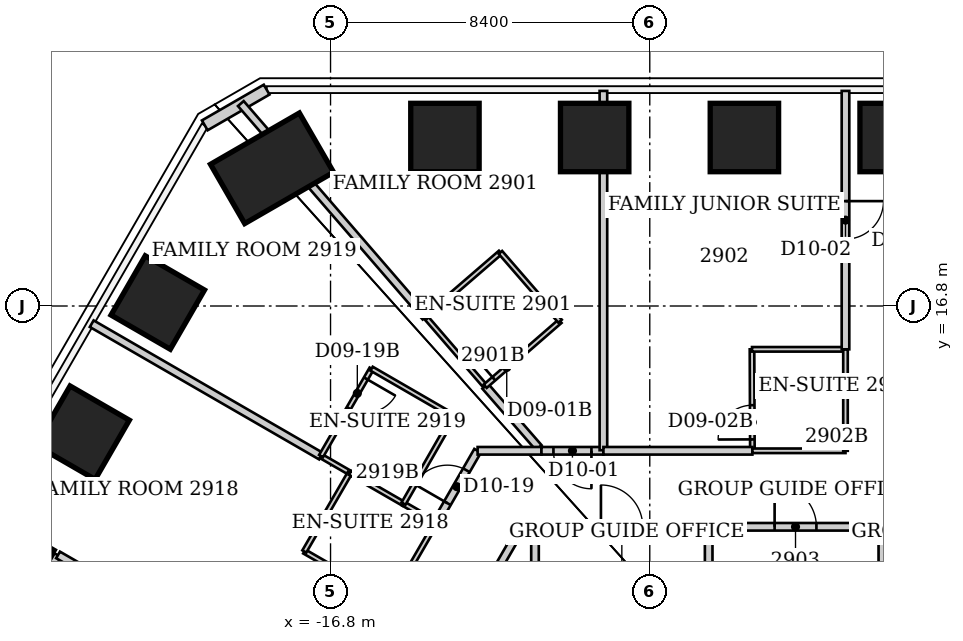
"""IFC4 building model, lengths in metres.
Left out: names, types, materials, properties, quantities, classifications, styles, units other than length and angle.
Written with IfcOpenShell. Run it as: python <this file> out.ifc"""

import sys

from ifc_helpers import new_model, si_unit, direction, frame, frame_2d, origin, origin_2d, place, context, subcontext, project, spatial, rectangle, extrude, element, fill, save


model = new_model("IFC4")
c1 = context("Model", 3, precision=1e-05, world=origin(), true_north=direction((0.0, 1.0)))
c2 = subcontext(c1, "Body", "Model", "MODEL_VIEW")
j1 = project(units=[si_unit("LENGTHUNIT", "METRE"), si_unit("PLANEANGLEUNIT", "RADIAN")], contexts=[c1])
p1 = place(None, origin())
s1 = spatial("IfcSite", under=j1, at=p1, CompositionType="ELEMENT")
p2 = place(p1, origin())
s2 = spatial("IfcBuilding", under=s1, at=p2, CompositionType="ELEMENT")
p3 = place(p2, frame((0.0, 0.0, 119.6)))
s3 = spatial("IfcBuildingStorey", under=s2, at=p3, CompositionType="ELEMENT", Elevation=119.6)
for number, where, z_axis, x_axis in (
    (1, (-13.79, 21.234, 0.0), (0.0, 0.0, 1.0), (0.0, 1.0, 0.0)),
    (2, (-9.85, 21.234, 0.0), (0.0, 0.0, 1.0), (0.0, 1.0, 0.0)),
    (3, (-5.91, 21.234, 0.0), (0.0, 0.0, 1.0), (0.0, 1.0, 0.0)),
    (4, (-1.97, 21.234, 0.0), (0.0, 0.0, 1.0), (0.0, 1.0, 0.0)),
    (5, (-25.302, 10.041, 0.0), (0.0, 0.0, 1.0), (-0.866, 0.5, 0.0)),
    (6, (-23.324, 13.466, 0.0), (0.0, 0.0, 1.0), (-0.866, 0.5, 0.0)),
    (7, (-21.346, 16.891, 0.0), (0.0, 0.0, 1.0), (-0.866, 0.5, 0.0)),
):
    element("IfcColumn", number, at=place(p3, frame(where, z_axis=z_axis, x_axis=x_axis)), inside=s3, PredefinedType="COLUMN", context=c2, shape_type="SweptSolid", body=[
        extrude(rectangle(XDim=1.8, YDim=1.8, at=origin_2d()), origin(), (0.0, 0.0, 1.0), 3.8),
    ])
p4 = place(p3, frame((-18.339, 20.424, 0.0), z_axis=(0.0, 0.0, 1.0), x_axis=(-0.5, 0.866025403784, 0.0)))
e8 = element("IfcColumn", 8, at=p4, inside=s3, PredefinedType="COLUMN", context=c2, shape_type="SweptSolid", body=[
    extrude(rectangle(XDim=1.8, YDim=2.7, at=origin_2d()), origin(), (0.0, 0.0, 1.0), 3.8),
])
p5 = place(p3, frame((-20.11, 21.554, 0.0), z_axis=(0.0, 0.0, 1.0), x_axis=(0.865988793993, 0.500063404658, 0.0)))
e9 = element("IfcWall", 9, at=p5, inside=s3, PredefinedType="SOLIDWALL", context=c2, shape_type="SweptSolid", body=[
    extrude(rectangle(XDim=1.88, YDim=0.3, at=frame_2d((0.94, 0.0))), origin(), (0.0, 0.0, 1.0), 3.64),
])
p6 = place(p3, frame((-24.57, 9.21, 0.0), z_axis=(0.0, 0.0, 1.0), x_axis=(0.499734288277, 0.866178758179, 0.0)))
e10 = element("IfcWall", 10, at=p6, inside=s3, PredefinedType="PARTITIONING", context=c2, shape_type="SweptSolid", body=[
    extrude(rectangle(XDim=1.191, YDim=0.2, at=frame_2d((0.595, 0.0))), origin(), (0.0, 0.0, 1.0), 3.64),
])
p7 = place(p3, frame((-23.084, 16.335, 0.0), z_axis=(0.0, 0.0, 1.0), x_axis=(0.865889693368, -0.500234983702, 0.0)))
e11 = element("IfcWall", 11, at=p7, inside=s3, PredefinedType="PARTITIONING", context=c2, shape_type="SweptSolid", body=[
    extrude(rectangle(XDim=6.968, YDim=0.2, at=frame_2d((3.484, 0.0))), origin(), (0.0, 0.0, 1.0), 3.64),
])
p8 = place(p3, frame((-19.16, 22.127, 0.0), z_axis=(0.0, 0.0, 1.0), x_axis=(0.654324699903, -0.756213717871, 0.0)))
e12 = element("IfcWall", 12, at=p8, inside=s3, PredefinedType="PARTITIONING", context=c2, shape_type="SweptSolid", body=[
    extrude(rectangle(XDim=7.428, YDim=0.2, at=frame_2d((3.714, 0.0))), origin(), (0.0, 0.0, 1.0), 3.64),
])
p9 = place(p3, frame((-17.49, 10.34, 0.0), z_axis=(0.0, 0.0, 1.0), x_axis=(0.866114241029, -0.499846097802, 0.0)))
e13 = element("IfcWall", 13, at=p9, inside=s3, PredefinedType="PARTITIONING", context=c2, shape_type="SweptSolid", body=[
    extrude(rectangle(XDim=2.621, YDim=0.12, at=frame_2d((1.311, 0.0))), origin(), (0.0, 0.0, 1.0), 3.64),
])
p10 = place(p9, frame((1.421, 0.0, 0.0)))
e14 = element("IfcOpeningElement", 14, at=p10, cuts=e13, PredefinedType="OPENING", context=c2, shape_type="SweptSolid", body=[
    extrude(rectangle(XDim=0.9, YDim=2.03, at=frame_2d((0.45, 1.015))), frame((0.0, 0.06, 0.0), z_axis=(0.0, -1.0, 0.0), x_axis=(1.0, 0.0, 0.0)), (0.0, 0.0, 1.0), 0.12),
])
p11 = place(p3, frame((-17.051, 12.849, 0.0), z_axis=(0.0, 0.0, 1.0), x_axis=(0.865838315616, -0.500323906295, 0.0)))
e15 = element("IfcWall", 15, at=p11, inside=s3, PredefinedType="PARTITIONING", context=c2, shape_type="SweptSolid", body=[
    extrude(rectangle(XDim=0.878, YDim=0.12, at=frame_2d((0.439, 0.0))), origin(), (0.0, 0.0, 1.0), 3.64),
])
p12 = place(p3, frame((-16.88, 6.16, 0.0), z_axis=(0.0, 0.0, 1.0), x_axis=(-0.866203958324, 0.499690606859, 0.0)))
e16 = element("IfcWall", 16, at=p12, inside=s3, PredefinedType="PARTITIONING", context=c2, shape_type="SweptSolid", body=[
    extrude(rectangle(XDim=8.185, YDim=0.2, at=frame_2d((4.093, 0.0))), origin(), (0.0, 0.0, 1.0), 3.64),
])
p13 = place(p12, frame((3.593, 0.0, 0.0)))
e17 = element("IfcOpeningElement", 17, at=p13, cuts=e16, PredefinedType="OPENING", context=c2, shape_type="SweptSolid", body=[
    extrude(rectangle(XDim=1.0, YDim=2.13, at=frame_2d((0.5, 1.065))), frame((0.0, 0.1, 0.0), z_axis=(0.0, -1.0, 0.0), x_axis=(1.0, 0.0, 0.0)), (0.0, 0.0, 1.0), 0.2),
])
p14 = place(p3, frame((-16.29, 12.41, 0.0), z_axis=(0.0, 0.0, 1.0), x_axis=(-0.501547039172, -0.865130376012, 0.0)))
e18 = element("IfcWall", 18, at=p14, inside=s3, PredefinedType="PARTITIONING", context=c2, shape_type="SweptSolid", body=[
    extrude(rectangle(XDim=2.393, YDim=0.12, at=frame_2d((1.196, 0.0))), origin(), (0.0, 0.0, 1.0), 3.64),
])
p15 = place(p3, frame((-16.29, 12.41, 0.0), z_axis=(0.0, 0.0, 1.0), x_axis=(0.866138091645, -0.499804768086, 0.0)))
e19 = element("IfcWall", 19, at=p15, inside=s3, PredefinedType="PARTITIONING", context=c2, shape_type="SweptSolid", body=[
    extrude(rectangle(XDim=1.626, YDim=0.12, at=frame_2d((0.813, 0.0))), origin(), (0.0, 0.0, 1.0), 3.64),
])
p16 = place(p3, frame((-15.98, 3.7, 0.0), z_axis=(0.0, 0.0, 1.0), x_axis=(0.500093981358, 0.865971136822, 0.0)))
e20 = element("IfcWall", 20, at=p16, inside=s3, PredefinedType="PARTITIONING", context=c2, shape_type="SweptSolid", body=[
    extrude(rectangle(XDim=8.418, YDim=0.2, at=frame_2d((4.209, 0.0))), origin(), (0.0, 0.0, 1.0), 3.64),
])
p17 = place(p3, frame((-15.72, 15.15, 0.0), z_axis=(0.0, 0.0, 1.0), x_axis=(-0.500605174168, -0.865675724273, 0.0)))
e21 = element("IfcWall", 21, at=p17, inside=s3, PredefinedType="PARTITIONING", context=c2, shape_type="SweptSolid", body=[
    extrude(rectangle(XDim=2.657, YDim=0.12, at=frame_2d((1.329, 0.0))), origin(), (0.0, 0.0, 1.0), 3.64),
])
p18 = place(p17, frame((0.3, 0.0, 0.0)))
e22 = element("IfcOpeningElement", 22, at=p18, cuts=e21, PredefinedType="OPENING", context=c2, shape_type="SweptSolid", body=[
    extrude(rectangle(XDim=0.9, YDim=2.03, at=frame_2d((0.45, 1.015))), frame((0.0, 0.06, 0.0), z_axis=(0.0, -1.0, 0.0), x_axis=(1.0, 0.0, 0.0)), (0.0, 0.0, 1.0), 0.12),
])
p19 = place(p3, frame((-15.22, 9.03, 0.0), z_axis=(0.0, 0.0, 1.0), x_axis=(0.501502765098, 0.865156041763, 0.0)))
e23 = element("IfcWall", 23, at=p19, inside=s3, PredefinedType="PARTITIONING", context=c2, shape_type="SweptSolid", body=[
    extrude(rectangle(XDim=2.393, YDim=0.12, at=frame_2d((1.196, 0.0))), origin(), (0.0, 0.0, 1.0), 3.64),
])
p20 = place(p3, frame((-14.882, 11.597, 0.0), z_axis=(0.0, 0.0, 1.0), x_axis=(0.866181499781, -0.499729536286, 0.0)))
e24 = element("IfcWall", 24, at=p20, inside=s3, PredefinedType="PARTITIONING", context=c2, shape_type="SweptSolid", body=[
    extrude(rectangle(XDim=0.995, YDim=0.12, at=frame_2d((0.497, 0.0))), origin(), (0.0, 0.0, 1.0), 3.64),
])
p21 = place(p3, frame((-14.88, 11.6, 0.0), z_axis=(0.0, 0.0, 1.0), x_axis=(0.497704656183, 0.867346571569, 0.0)))
e25 = element("IfcWall", 25, at=p21, inside=s3, PredefinedType="PARTITIONING", context=c2, shape_type="SweptSolid", body=[
    extrude(rectangle(XDim=2.652, YDim=0.12, at=frame_2d((1.326, 0.0))), origin(), (0.0, 0.0, 1.0), 3.64),
])
p22 = place(p3, frame((-14.3, 16.51, 0.0), z_axis=(0.0, 0.0, 1.0), x_axis=(0.653188728136, -0.757195143563, 0.0)))
e26 = element("IfcWall", 26, at=p22, inside=s3, PredefinedType="PARTITIONING", context=c2, shape_type="SweptSolid", body=[
    extrude(rectangle(XDim=2.404, YDim=0.12, at=frame_2d((1.202, 0.0))), origin(), (0.0, 0.0, 1.0), 3.64),
])
p23 = place(p3, frame((-14.02, 11.1, 0.0), z_axis=(0.0, 0.0, 1.0), x_axis=(0.499641723021, 0.866232156305, 0.0)))
e27 = element("IfcWall", 27, at=p23, inside=s3, PredefinedType="PARTITIONING", context=c2, shape_type="SweptSolid", body=[
    extrude(rectangle(XDim=2.182, YDim=0.2, at=frame_2d((1.091, 0.0))), origin(), (0.0, 0.0, 1.0), 3.64),
])
p24 = place(p23, frame((0.591, 0.0, 0.0)))
e28 = element("IfcOpeningElement", 28, at=p24, cuts=e27, PredefinedType="OPENING", context=c2, shape_type="SweptSolid", body=[
    extrude(rectangle(XDim=1.0, YDim=2.13, at=frame_2d((0.5, 1.065))), frame((0.0, 0.1, 0.0), z_axis=(0.0, -1.0, 0.0), x_axis=(1.0, 0.0, 0.0)), (0.0, 0.0, 1.0), 0.2),
])
p25 = place(p3, frame((-13.56, 13.9, 0.0), z_axis=(0.0, 0.0, 1.0), x_axis=(-0.865508881864, 0.500893576935, 0.0)))
e29 = element("IfcWall", 29, at=p25, inside=s3, PredefinedType="PARTITIONING", context=c2, shape_type="SweptSolid", body=[
    extrude(rectangle(XDim=2.496, YDim=0.12, at=frame_2d((1.248, 0.0))), origin(), (0.0, 0.0, 1.0), 3.64),
])
p26 = place(p3, frame((-12.73, 14.69, 0.0), z_axis=(0.0, 0.0, 1.0), x_axis=(0.656624063312, -0.754218031792, 0.0)))
e30 = element("IfcWall", 30, at=p26, inside=s3, PredefinedType="PARTITIONING", context=c2, shape_type="SweptSolid", body=[
    extrude(rectangle(XDim=2.144, YDim=0.2, at=frame_2d((1.072, 0.0))), origin(), (0.0, 0.0, 1.0), 3.64),
])
p27 = place(p3, frame((-12.73, 14.69, 0.0), z_axis=(0.0, 0.0, 1.0), x_axis=(0.755185511235, 0.655511131576, 0.0)))
e31 = element("IfcWall", 31, at=p27, inside=s3, PredefinedType="PARTITIONING", context=c2, shape_type="SweptSolid", body=[
    extrude(rectangle(XDim=2.609, YDim=0.12, at=frame_2d((1.304, 0.0))), origin(), (0.0, 0.0, 1.0), 3.64),
])
p28 = place(p27, frame((0.3, 0.0, 0.0)))
e32 = element("IfcOpeningElement", 32, at=p28, cuts=e31, PredefinedType="OPENING", context=c2, shape_type="SweptSolid", body=[
    extrude(rectangle(XDim=0.9, YDim=2.03, at=frame_2d((0.45, 1.015))), frame((0.0, 0.06, 0.0), z_axis=(0.0, -1.0, 0.0), x_axis=(1.0, 0.0, 0.0)), (0.0, 0.0, 1.0), 0.12),
])
p29 = place(p3, frame((-12.33, 18.21, 0.0), z_axis=(0.0, 0.0, 1.0), x_axis=(-0.757086659925, -0.653314464377, 0.0)))
e33 = element("IfcWall", 33, at=p29, inside=s3, PredefinedType="PARTITIONING", context=c2, shape_type="SweptSolid", body=[
    extrude(rectangle(XDim=2.602, YDim=0.12, at=frame_2d((1.301, 0.0))), origin(), (0.0, 0.0, 1.0), 3.64),
])
p30 = place(p3, frame((-11.77, 10.99, 0.0), z_axis=(0.0, 0.0, 1.0), x_axis=(1.0, 0.0, 0.0)))
e34 = element("IfcWall", 34, at=p30, inside=s3, PredefinedType="PARTITIONING", context=c2, shape_type="SweptSolid", body=[
    extrude(rectangle(XDim=0.35, YDim=0.2, at=frame_2d((0.175, 0.0))), origin(), (0.0, 0.0, 1.0), 3.64),
])
p31 = place(p3, frame((-11.42, 10.98, 0.0), z_axis=(0.0, 0.0, 1.0), x_axis=(0.0, -1.0, 0.0)))
e35 = element("IfcWall", 35, at=p31, inside=s3, PredefinedType="PARTITIONING", context=c2, shape_type="SweptSolid", body=[
    extrude(rectangle(XDim=14.995, YDim=0.2, at=frame_2d((7.498, 0.0))), origin(), (0.0, 0.0, 1.0), 3.64),
])
p32 = place(p3, frame((-11.42, 10.99, 0.0), z_axis=(0.0, 0.0, 1.0), x_axis=(1.0, 0.0, 0.0)))
e36 = element("IfcWall", 36, at=p32, inside=s3, PredefinedType="PARTITIONING", context=c2, shape_type="SweptSolid", body=[
    extrude(rectangle(XDim=4.57, YDim=0.2, at=frame_2d((2.285, 0.0))), origin(), (0.0, 0.0, 1.0), 3.64),
])
p33 = place(p32, frame((1.735, 0.0, 0.0)))
e37 = element("IfcOpeningElement", 37, at=p33, cuts=e36, PredefinedType="OPENING", context=c2, shape_type="SweptSolid", body=[
    extrude(rectangle(XDim=1.1, YDim=2.2, at=frame_2d((0.55, 1.1))), frame((0.0, 0.1, 0.0), z_axis=(0.0, -1.0, 0.0), x_axis=(1.0, 0.0, 0.0)), (0.0, 0.0, 1.0), 0.2),
])
p34 = place(p3, frame((-11.25, 12.99, 0.0), z_axis=(0.0, 0.0, 1.0), x_axis=(-1.0, 0.0, 0.0)))
e38 = element("IfcWall", 38, at=p34, inside=s3, PredefinedType="PARTITIONING", context=c2, shape_type="SweptSolid", body=[
    extrude(rectangle(XDim=1.68, YDim=0.2, at=frame_2d((0.84, 0.0))), origin(), (0.0, 0.0, 1.0), 3.64),
])
p35 = place(p3, frame((-10.76, 16.4, 0.0), z_axis=(0.0, 0.0, 1.0), x_axis=(-0.655252439976, 0.755409981338, 0.0)))
e39 = element("IfcWall", 39, at=p35, inside=s3, PredefinedType="PARTITIONING", context=c2, shape_type="SweptSolid", body=[
    extrude(rectangle(XDim=2.396, YDim=0.12, at=frame_2d((1.198, 0.0))), origin(), (0.0, 0.0, 1.0), 3.64),
])
p36 = place(p3, frame((-9.62, 12.99, 0.0), z_axis=(0.0, 0.0, 1.0), x_axis=(-1.0, 0.0, 0.0)))
e40 = element("IfcWall", 40, at=p36, inside=s3, PredefinedType="PARTITIONING", context=c2, shape_type="SweptSolid", body=[
    extrude(rectangle(XDim=1.63, YDim=0.2, at=frame_2d((0.815, 0.0))), origin(), (0.0, 0.0, 1.0), 3.64),
])
p37 = place(p36, frame((0.315, 0.0, 0.0)))
e41 = element("IfcOpeningElement", 41, at=p37, cuts=e40, PredefinedType="OPENING", context=c2, shape_type="SweptSolid", body=[
    extrude(rectangle(XDim=1.0, YDim=2.13, at=frame_2d((0.5, 1.065))), frame((0.0, 0.1, 0.0), z_axis=(0.0, -1.0, 0.0), x_axis=(1.0, 0.0, 0.0)), (0.0, 0.0, 1.0), 0.2),
])
p38 = place(p3, frame((-9.62, 22.46, 0.0), z_axis=(0.0, 0.0, 1.0), x_axis=(0.0, -1.0, 0.0)))
e42 = element("IfcWall", 42, at=p38, inside=s3, PredefinedType="PARTITIONING", context=c2, shape_type="SweptSolid", body=[
    extrude(rectangle(XDim=9.455, YDim=0.2, at=frame_2d((4.728, 0.0))), origin(), (0.0, 0.0, 1.0), 3.64),
])
p39 = place(p3, frame((-6.85, 10.98, 0.0), z_axis=(0.0, 0.0, 1.0), x_axis=(0.0, -1.0, 0.0)))
e43 = element("IfcWall", 43, at=p39, inside=s3, PredefinedType="PARTITIONING", context=c2, shape_type="SweptSolid", body=[
    extrude(rectangle(XDim=1.77, YDim=0.2, at=frame_2d((0.885, 0.0))), origin(), (0.0, 0.0, 1.0), 3.64),
])
p40 = place(p3, frame((-6.85, 10.99, 0.0), z_axis=(0.0, 0.0, 1.0), x_axis=(1.0, 0.0, 0.0)))
e44 = element("IfcWall", 44, at=p40, inside=s3, PredefinedType="PARTITIONING", context=c2, shape_type="SweptSolid", body=[
    extrude(rectangle(XDim=4.57, YDim=0.2, at=frame_2d((2.285, 0.0))), origin(), (0.0, 0.0, 1.0), 3.64),
])
p41 = place(p40, frame((1.735, 0.0, 0.0)))
e45 = element("IfcOpeningElement", 45, at=p41, cuts=e44, PredefinedType="OPENING", context=c2, shape_type="SweptSolid", body=[
    extrude(rectangle(XDim=1.1, YDim=2.2, at=frame_2d((0.55, 1.1))), frame((0.0, 0.1, 0.0), z_axis=(0.0, -1.0, 0.0), x_axis=(1.0, 0.0, 0.0)), (0.0, 0.0, 1.0), 0.2),
])
p42 = place(p3, frame((-5.71, 15.66, 0.0), z_axis=(0.0, 0.0, 1.0), x_axis=(0.003749059241, -0.999992972253, 0.0)))
e46 = element("IfcWall", 46, at=p42, inside=s3, PredefinedType="PARTITIONING", context=c2, shape_type="SweptSolid", body=[
    extrude(rectangle(XDim=2.67, YDim=0.12, at=frame_2d((1.335, 0.0))), origin(), (0.0, 0.0, 1.0), 3.64),
])
p43 = place(p42, frame((1.47, 0.0, 0.0)))
e47 = element("IfcOpeningElement", 47, at=p43, cuts=e46, PredefinedType="OPENING", context=c2, shape_type="SweptSolid", body=[
    extrude(rectangle(XDim=0.9, YDim=2.03, at=frame_2d((0.45, 1.015))), frame((0.0, 0.06, 0.0), z_axis=(0.0, -1.0, 0.0), x_axis=(1.0, 0.0, 0.0)), (0.0, 0.0, 1.0), 0.12),
])
p44 = place(p3, frame((-5.7, 12.99, 0.0), z_axis=(0.0, 0.0, 1.0), x_axis=(-1.0, 0.0, 0.0)))
e48 = element("IfcWall", 48, at=p44, inside=s3, PredefinedType="PARTITIONING", context=c2, shape_type="SweptSolid", body=[
    extrude(rectangle(XDim=3.92, YDim=0.2, at=frame_2d((1.96, 0.0))), origin(), (0.0, 0.0, 1.0), 3.64),
])
p45 = place(p3, frame((-3.25, 12.99, 0.0), z_axis=(0.0, 0.0, 1.0), x_axis=(-1.0, 0.0, 0.0)))
e49 = element("IfcWall", 49, at=p45, inside=s3, PredefinedType="PARTITIONING", context=c2, shape_type="SweptSolid", body=[
    extrude(rectangle(XDim=2.45, YDim=0.12, at=frame_2d((1.225, 0.0))), origin(), (0.0, 0.0, 1.0), 3.64),
])
p46 = place(p3, frame((-3.25, 15.66, 0.0), z_axis=(0.0, 0.0, 1.0), x_axis=(-1.0, 0.0, 0.0)))
e50 = element("IfcWall", 50, at=p46, inside=s3, PredefinedType="PARTITIONING", context=c2, shape_type="SweptSolid", body=[
    extrude(rectangle(XDim=2.46, YDim=0.12, at=frame_2d((1.23, 0.0))), origin(), (0.0, 0.0, 1.0), 3.64),
])
p47 = place(p3, frame((-3.25, 15.66, 0.0), z_axis=(0.0, 0.0, 1.0), x_axis=(0.0, -1.0, 0.0)))
e51 = element("IfcWall", 51, at=p47, inside=s3, PredefinedType="PARTITIONING", context=c2, shape_type="SweptSolid", body=[
    extrude(rectangle(XDim=2.67, YDim=0.12, at=frame_2d((1.335, 0.0))), origin(), (0.0, 0.0, 1.0), 3.64),
])
p48 = place(p3, frame((-3.25, 22.46, 0.0), z_axis=(0.0, 0.0, 1.0), x_axis=(0.0, -1.0, 0.0)))
e52 = element("IfcWall", 52, at=p48, inside=s3, PredefinedType="PARTITIONING", context=c2, shape_type="SweptSolid", body=[
    extrude(rectangle(XDim=6.8, YDim=0.2, at=frame_2d((3.4, 0.0))), origin(), (0.0, 0.0, 1.0), 3.64),
])
p49 = place(p48, frame((2.9, 0.0, 0.0)))
e53 = element("IfcOpeningElement", 53, at=p49, cuts=e52, PredefinedType="OPENING", context=c2, shape_type="SweptSolid", body=[
    extrude(rectangle(XDim=1.0, YDim=2.13, at=frame_2d((0.5, 1.065))), frame((0.0, 0.1, 0.0), z_axis=(0.0, -1.0, 0.0), x_axis=(1.0, 0.0, 0.0)), (0.0, 0.0, 1.0), 0.2),
])
p50 = place(p3, frame((-2.28, 10.98, 0.0), z_axis=(0.0, 0.0, 1.0), x_axis=(0.0, -1.0, 0.0)))
e54 = element("IfcWall", 54, at=p50, inside=s3, PredefinedType="PARTITIONING", context=c2, shape_type="SweptSolid", body=[
    extrude(rectangle(XDim=1.77, YDim=0.2, at=frame_2d((0.885, 0.0))), origin(), (0.0, 0.0, 1.0), 3.64),
])
p51 = place(p3, frame((-2.28, 10.99, 0.0), z_axis=(0.0, 0.0, 1.0), x_axis=(1.0, 0.0, 0.0)))
e55 = element("IfcWall", 55, at=p51, inside=s3, PredefinedType="PARTITIONING", context=c2, shape_type="SweptSolid", body=[
    extrude(rectangle(XDim=4.56, YDim=0.2, at=frame_2d((2.28, 0.0))), origin(), (0.0, 0.0, 1.0), 3.64),
])
p52 = place(p51, frame((1.73, 0.0, 0.0)))
e56 = element("IfcOpeningElement", 56, at=p52, cuts=e55, PredefinedType="OPENING", context=c2, shape_type="SweptSolid", body=[
    extrude(rectangle(XDim=1.1, YDim=2.2, at=frame_2d((0.55, 1.1))), frame((0.0, 0.1, 0.0), z_axis=(0.0, -1.0, 0.0), x_axis=(1.0, 0.0, 0.0)), (0.0, 0.0, 1.0), 0.2),
])
p53 = place(p37, origin())
e57 = element("IfcDoor", 57, at=p53, inside=s3, OperationType="SINGLE_SWING_LEFT", PredefinedType="DOOR", context=c2, shape_type="SweptSolid", body=[
    extrude(rectangle(XDim=1.0, YDim=2.13, at=frame_2d((0.5, 1.065))), frame((0.0, 0.025, 0.0), z_axis=(0.0, -1.0, 0.0), x_axis=(1.0, 0.0, 0.0)), (0.0, 0.0, 1.0), 0.05),
])
fill(e41, e57)
p54 = place(p28, origin())
e58 = element("IfcDoor", 58, at=p54, inside=s3, OperationType="SINGLE_SWING_LEFT", PredefinedType="DOOR", context=c2, shape_type="SweptSolid", body=[
    extrude(rectangle(XDim=0.9, YDim=2.03, at=frame_2d((0.45, 1.015))), frame((0.0, 0.025, 0.0), z_axis=(0.0, -1.0, 0.0), x_axis=(1.0, 0.0, 0.0)), (0.0, 0.0, 1.0), 0.05),
])
fill(e32, e58)
p55 = place(p49, origin())
e59 = element("IfcDoor", 59, at=p55, inside=s3, OperationType="SINGLE_SWING_LEFT", PredefinedType="DOOR", context=c2, shape_type="SweptSolid", body=[
    extrude(rectangle(XDim=1.0, YDim=2.13, at=frame_2d((0.5, 1.065))), frame((0.0, 0.025, 0.0), z_axis=(0.0, -1.0, 0.0), x_axis=(1.0, 0.0, 0.0)), (0.0, 0.0, 1.0), 0.05),
])
fill(e53, e59)
p56 = place(p43, origin())
e60 = element("IfcDoor", 60, at=p56, inside=s3, OperationType="SINGLE_SWING_RIGHT", PredefinedType="DOOR", context=c2, shape_type="SweptSolid", body=[
    extrude(rectangle(XDim=0.9, YDim=2.03, at=frame_2d((0.45, 1.015))), frame((0.0, 0.025, 0.0), z_axis=(0.0, -1.0, 0.0), x_axis=(1.0, 0.0, 0.0)), (0.0, 0.0, 1.0), 0.05),
])
fill(e47, e60)
p57 = place(p24, origin())
e61 = element("IfcDoor", 61, at=p57, inside=s3, OperationType="SINGLE_SWING_LEFT", PredefinedType="DOOR", context=c2, shape_type="SweptSolid", body=[
    extrude(rectangle(XDim=1.0, YDim=2.13, at=frame_2d((0.5, 1.065))), frame((0.0, 0.025, 0.0), z_axis=(0.0, -1.0, 0.0), x_axis=(1.0, 0.0, 0.0)), (0.0, 0.0, 1.0), 0.05),
])
fill(e28, e61)
p58 = place(p18, origin())
e62 = element("IfcDoor", 62, at=p58, inside=s3, OperationType="SINGLE_SWING_LEFT", PredefinedType="DOOR", context=c2, shape_type="SweptSolid", body=[
    extrude(rectangle(XDim=0.9, YDim=2.03, at=frame_2d((0.45, 1.015))), frame((0.0, 0.025, 0.0), z_axis=(0.0, -1.0, 0.0), x_axis=(1.0, 0.0, 0.0)), (0.0, 0.0, 1.0), 0.05),
])
fill(e22, e62)
p59 = place(p33, origin())
e63 = element("IfcDoor", 63, at=p59, inside=s3, OperationType="SINGLE_SWING_LEFT", PredefinedType="DOOR", context=c2, shape_type="SweptSolid", body=[
    extrude(rectangle(XDim=1.1, YDim=2.2, at=frame_2d((0.55, 1.1))), frame((0.0, 0.025, 0.0), z_axis=(0.0, -1.0, 0.0), x_axis=(1.0, 0.0, 0.0)), (0.0, 0.0, 1.0), 0.05),
])
fill(e37, e63)
p60 = place(p41, origin())
e64 = element("IfcDoor", 64, at=p60, inside=s3, OperationType="SINGLE_SWING_LEFT", PredefinedType="DOOR", context=c2, shape_type="SweptSolid", body=[
    extrude(rectangle(XDim=1.1, YDim=2.2, at=frame_2d((0.55, 1.1))), frame((0.0, 0.025, 0.0), z_axis=(0.0, -1.0, 0.0), x_axis=(1.0, 0.0, 0.0)), (0.0, 0.0, 1.0), 0.05),
])
fill(e45, e64)
save(model, sys.argv[1])
